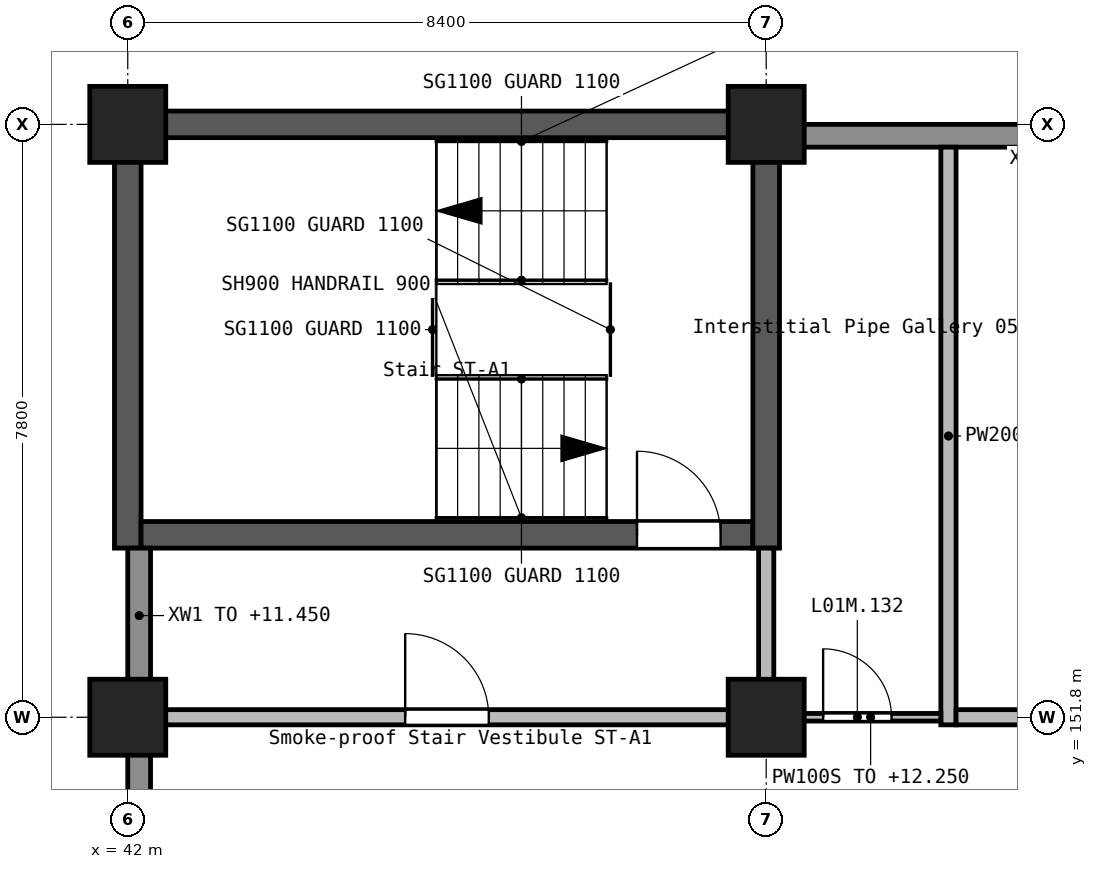
"""IFC4 building model, lengths in metres.
Left out: names, types, materials, properties, quantities, classifications, styles, units other than length and angle.
Written with IfcOpenShell. Run it as: python <this file> out.ifc"""

import sys

from ifc_helpers import new_model, si_unit, direction, frame, frame_2d, origin, origin_2d, place, context, subcontext, project, spatial, rectangle, extrude, element, fill, save


model = new_model("IFC4")
c1 = context("Model", 3, precision=1e-05, world=origin(), true_north=direction((0.0, 1.0)))
c2 = subcontext(c1, "Body", "Model", "MODEL_VIEW")
j1 = project(units=[si_unit("LENGTHUNIT", "METRE"), si_unit("PLANEANGLEUNIT", "RADIAN")], contexts=[c1])
p1 = place(None, origin())
s1 = spatial("IfcSite", under=j1, at=p1, CompositionType="ELEMENT")
p2 = place(p1, origin())
s2 = spatial("IfcBuilding", under=s1, at=p2, CompositionType="ELEMENT")
p3 = place(p2, frame((0.0, 0.0, 9.9)))
s3 = spatial("IfcBuildingStorey", under=s2, at=p3, CompositionType="ELEMENT", Elevation=9.9)
for number, where, z_axis, x_axis in (
    (1, (42.0, 151.8, 0.0), (0.0, 0.0, 1.0), (1.0, 0.0, 0.0)),
    (2, (42.0, 159.6, 0.0), (0.0, 0.0, 1.0), (1.0, 0.0, 0.0)),
    (3, (50.4, 151.8, 0.0), (0.0, 0.0, 1.0), (1.0, 0.0, 0.0)),
    (4, (50.4, 159.6, 0.0), (0.0, 0.0, 1.0), (1.0, 0.0, 0.0)),
):
    element("IfcColumn", number, at=place(p3, frame(where, z_axis=z_axis, x_axis=x_axis)), inside=s3, PredefinedType="COLUMN", context=c2, shape_type="SweptSolid", body=[
        extrude(rectangle(XDim=1.0, YDim=1.0, at=origin_2d()), origin(), (0.0, 0.0, 1.0), 2.7),
    ])
p4 = place(p3, frame((41.825, 159.6, 0.0), z_axis=(0.0, 0.0, 1.0), x_axis=(1.0, 0.0, 0.0)))
e5 = element("IfcWall", 5, at=p4, inside=s3, PredefinedType="SHEAR", context=c2, shape_type="SweptSolid", body=[
    extrude(rectangle(XDim=8.4, YDim=0.35, at=frame_2d((4.2, 0.0))), origin(), (0.0, 0.0, 1.0), 2.7),
])
p5 = place(p3, frame((42.0, 154.025, 0.0), z_axis=(0.0, 0.0, 1.0), x_axis=(0.0, 1.0, 0.0)))
e6 = element("IfcWall", 6, at=p5, inside=s3, PredefinedType="SHEAR", context=c2, shape_type="SweptSolid", body=[
    extrude(rectangle(XDim=5.4, YDim=0.35, at=frame_2d((2.7, 0.0))), origin(), (0.0, 0.0, 1.0), 2.7),
])
p6 = place(p3, frame((42.175, 154.2, 0.0), z_axis=(0.0, 0.0, 1.0), x_axis=(1.0, 0.0, 0.0)))
e7 = element("IfcWall", 7, at=p6, inside=s3, PredefinedType="SHEAR", context=c2, shape_type="SweptSolid", body=[
    extrude(rectangle(XDim=8.05, YDim=0.35, at=frame_2d((4.025, 0.0))), origin(), (0.0, 0.0, 1.0), 2.7),
])
p7 = place(p6, frame((6.525, 0.0, 0.0)))
e8 = element("IfcOpeningElement", 8, at=p7, cuts=e7, PredefinedType="OPENING", context=c2, shape_type="SweptSolid", body=[
    extrude(rectangle(XDim=1.1, YDim=2.1, at=frame_2d((0.55, 1.05))), frame((0.0, 0.185, 0.0), z_axis=(0.0, -1.0, 0.0), x_axis=(1.0, 0.0, 0.0)), (0.0, 0.0, 1.0), 0.37),
])
p8 = place(p3, frame((50.4, 154.025, 0.0), z_axis=(0.0, 0.0, 1.0), x_axis=(0.0, 1.0, 0.0)))
e9 = element("IfcWall", 9, at=p8, inside=s3, PredefinedType="SHEAR", context=c2, shape_type="SweptSolid", body=[
    extrude(rectangle(XDim=5.75, YDim=0.35, at=frame_2d((2.875, 0.0))), origin(), (0.0, 0.0, 1.0), 2.7),
])
p9 = place(p3, frame((58.35, 159.45, 0.0), z_axis=(0.0, 0.0, 1.0), x_axis=(-1.0, 0.0, 0.0)))
e10 = element("IfcWall", 10, at=p9, inside=s3, PredefinedType="STANDARD", context=c2, shape_type="SweptSolid", body=[
    extrude(rectangle(XDim=7.5, YDim=0.3, at=frame_2d((3.75, 0.0))), origin(), (0.0, 0.0, 1.0), 1.55),
])
p10 = place(p3, frame((42.15, 154.025, 0.0), z_axis=(0.0, 0.0, 1.0), x_axis=(0.0, -1.0, 0.0)))
e11 = element("IfcWall", 11, at=p10, inside=s3, PredefinedType="STANDARD", context=c2, shape_type="SweptSolid", body=[
    extrude(rectangle(XDim=1.775, YDim=0.3, at=frame_2d((0.887, 0.0))), origin(), (0.0, 0.0, 1.0), 1.55),
])
p11 = place(p3, frame((42.15, 151.35, 0.0), z_axis=(0.0, 0.0, 1.0), x_axis=(0.0, -1.0, 0.0)))
e12 = element("IfcWall", 12, at=p11, inside=s3, PredefinedType="STANDARD", context=c2, shape_type="SweptSolid", body=[
    extrude(rectangle(XDim=2.7, YDim=0.3, at=frame_2d((1.35, 0.0))), origin(), (0.0, 0.0, 1.0), 1.55),
])
p12 = place(p3, frame((42.45, 151.8, 0.0), z_axis=(0.0, 0.0, 1.0), x_axis=(1.0, 0.0, 0.0)))
e13 = element("IfcWall", 13, at=p12, inside=s3, PredefinedType="SOLIDWALL", context=c2, shape_type="SweptSolid", body=[
    extrude(rectangle(XDim=7.5, YDim=0.2, at=frame_2d((3.75, 0.0))), origin(), (0.0, 0.0, 1.0), 2.35),
])
p13 = place(p12, frame((3.2, 0.0, 0.0)))
e14 = element("IfcOpeningElement", 14, at=p13, cuts=e13, PredefinedType="OPENING", context=c2, shape_type="SweptSolid", body=[
    extrude(rectangle(XDim=1.1, YDim=2.1, at=frame_2d((0.55, 1.05))), frame((0.0, 0.11, 0.0), z_axis=(0.0, -1.0, 0.0), x_axis=(1.0, 0.0, 0.0)), (0.0, 0.0, 1.0), 0.22),
])
p14 = place(p3, frame((52.798, 151.7, 0.0), z_axis=(0.0, 0.0, 1.0), x_axis=(0.0, 1.0, 0.0)))
e15 = element("IfcWall", 15, at=p14, inside=s3, PredefinedType="SOLIDWALL", context=c2, shape_type="SweptSolid", body=[
    extrude(rectangle(XDim=7.6, YDim=0.2, at=frame_2d((3.8, 0.0))), origin(), (0.0, 0.0, 1.0), 2.35),
])
p15 = place(p3, frame((52.898, 151.8, 0.0), z_axis=(0.0, 0.0, 1.0), x_axis=(1.0, 0.0, 0.0)))
e16 = element("IfcWall", 16, at=p15, inside=s3, PredefinedType="SOLIDWALL", context=c2, shape_type="SweptSolid", body=[
    extrude(rectangle(XDim=5.452, YDim=0.2, at=frame_2d((2.726, 0.0))), origin(), (0.0, 0.0, 1.0), 2.35),
])
p16 = place(p15, frame((2.4, 0.0, 0.0)))
e17 = element("IfcOpeningElement", 17, at=p16, cuts=e16, PredefinedType="OPENING", context=c2, shape_type="SweptSolid", body=[
    extrude(rectangle(XDim=1.0, YDim=2.1, at=frame_2d((0.5, 1.05))), frame((0.0, 0.11, 0.0), z_axis=(0.0, -1.0, 0.0), x_axis=(1.0, 0.0, 0.0)), (0.0, 0.0, 1.0), 0.22),
])
p17 = place(p3, frame((50.4, 152.25, 0.0), z_axis=(0.0, 0.0, 1.0), x_axis=(0.0, 1.0, 0.0)))
e18 = element("IfcWall", 18, at=p17, inside=s3, PredefinedType="SOLIDWALL", context=c2, shape_type="SweptSolid", body=[
    extrude(rectangle(XDim=1.775, YDim=0.2, at=frame_2d((0.887, 0.0))), origin(), (0.0, 0.0, 1.0), 2.35),
])
p18 = place(p3, frame((50.85, 151.8, 0.0), z_axis=(0.0, 0.0, 1.0), x_axis=(1.0, 0.0, 0.0)))
e19 = element("IfcWall", 19, at=p18, inside=s3, PredefinedType="PARTITIONING", context=c2, shape_type="SweptSolid", body=[
    extrude(rectangle(XDim=1.848, YDim=0.1, at=frame_2d((0.924, 0.0))), origin(), (0.0, 0.0, 1.0), 2.35),
])
p19 = place(p18, frame((0.299, 0.0, 0.0)))
e20 = element("IfcOpeningElement", 20, at=p19, cuts=e19, PredefinedType="OPENING", context=c2, shape_type="SweptSolid", body=[
    extrude(rectangle(XDim=0.9, YDim=2.1, at=frame_2d((0.45, 1.05))), frame((0.0, 0.06, 0.0), z_axis=(0.0, -1.0, 0.0), x_axis=(1.0, 0.0, 0.0)), (0.0, 0.0, 1.0), 0.12),
])
p20 = place(p7, origin())
e21 = element("IfcDoor", 21, at=p20, inside=s3, OperationType="SINGLE_SWING_RIGHT", PredefinedType="DOOR", context=c2, shape_type="SweptSolid", body=[
    extrude(rectangle(XDim=1.1, YDim=2.1, at=frame_2d((0.55, 1.05))), frame((0.0, 0.025, 0.0), z_axis=(0.0, -1.0, 0.0), x_axis=(1.0, 0.0, 0.0)), (0.0, 0.0, 1.0), 0.05),
])
fill(e8, e21)
p21 = place(p13, origin())
e22 = element("IfcDoor", 22, at=p21, inside=s3, OperationType="SINGLE_SWING_RIGHT", PredefinedType="DOOR", context=c2, shape_type="SweptSolid", body=[
    extrude(rectangle(XDim=1.1, YDim=2.1, at=frame_2d((0.55, 1.05))), frame((0.0, 0.025, 0.0), z_axis=(0.0, -1.0, 0.0), x_axis=(1.0, 0.0, 0.0)), (0.0, 0.0, 1.0), 0.05),
])
fill(e14, e22)
p22 = place(p19, origin())
e23 = element("IfcDoor", 23, at=p22, inside=s3, OperationType="SINGLE_SWING_LEFT", PredefinedType="DOOR", context=c2, shape_type="SweptSolid", body=[
    extrude(rectangle(XDim=0.9, YDim=2.1, at=frame_2d((0.45, 1.05))), frame((0.0, 0.025, 0.0), z_axis=(0.0, -1.0, 0.0), x_axis=(1.0, 0.0, 0.0)), (0.0, 0.0, 1.0), 0.05),
])
fill(e20, e23)
save(model, sys.argv[1])
